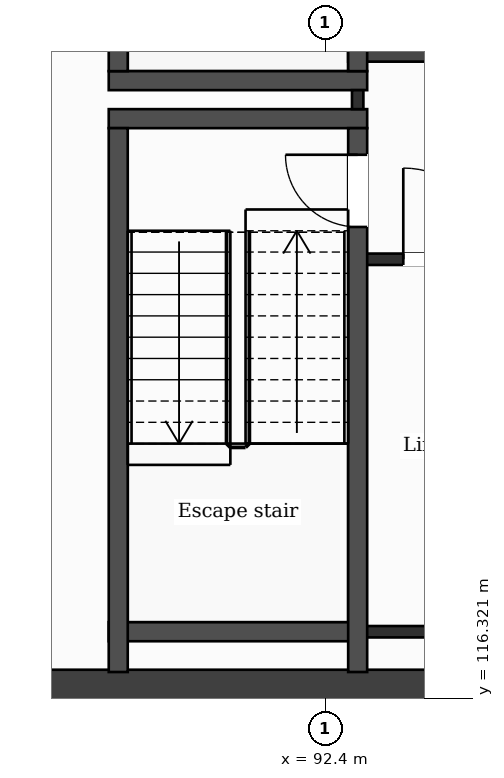
"""IFC4 building model, lengths in metres.
Left out: names, types, materials, properties, quantities, classifications, styles, units other than length and angle.
Written with IfcOpenShell. Run it as: python <this file> out.ifc"""

import sys

from ifc_helpers import new_model, si_unit, direction, frame, frame_2d, origin, place, context, subcontext, project, spatial, rectangle, extrude, element, fill, save


model = new_model("IFC4")
c1 = context("Model", 3, precision=1e-05, world=origin(), true_north=direction((0.0, 1.0)))
c2 = subcontext(c1, "Body", "Model", "MODEL_VIEW")
j1 = project(units=[si_unit("LENGTHUNIT", "METRE"), si_unit("PLANEANGLEUNIT", "RADIAN")], contexts=[c1])
p1 = place(None, origin())
s1 = spatial("IfcSite", under=j1, at=p1, CompositionType="ELEMENT")
p2 = place(p1, origin())
s2 = spatial("IfcBuilding", under=s1, at=p2, CompositionType="ELEMENT")
p3 = place(p2, frame((0.0, 0.0, 288.6)))
s3 = spatial("IfcBuildingStorey", under=s2, at=p3, CompositionType="ELEMENT", Elevation=288.6)
p4 = place(p3, frame((100.45, 116.35, 0.0), z_axis=(0.0, 0.0, 1.0), x_axis=(-1.0, 0.0, 0.0)))
e1 = element("IfcWall", 1, at=p4, inside=s3, PredefinedType="SHEAR", context=c2, shape_type="SweptSolid", body=[
    extrude(rectangle(XDim=13.627, YDim=0.7, at=frame_2d((6.813, 0.0))), origin(), (0.0, 0.0, 1.0), 3.7),
])
p5 = place(p3, frame((86.823, 116.35, 0.0), z_axis=(0.0, 0.0, 1.0), x_axis=(0.133416378607, 0.99106007382, 0.0)))
e2 = element("IfcWall", 2, at=p5, inside=s3, PredefinedType="SHEAR", context=c2, shape_type="SweptSolid", body=[
    extrude(rectangle(XDim=15.842, YDim=0.7, at=frame_2d((7.921, 0.0))), origin(), (0.0, 0.0, 1.0), 3.7),
])
p6 = place(p3, frame((92.827, 117.2, 0.0), z_axis=(0.0, 0.0, 1.0), x_axis=(1.0, 0.0, 0.0)))
e3 = element("IfcWall", 3, at=p6, inside=s3, PredefinedType="PARTITIONING", context=c2, shape_type="SweptSolid", body=[
    extrude(rectangle(XDim=2.4, YDim=0.15, at=frame_2d((1.2, 0.0))), origin(), (0.0, 0.0, 1.0), 3.38),
])
p7 = place(p3, frame((89.552, 117.2, 0.0), z_axis=(0.0, 0.0, 1.0), x_axis=(1.0, 0.0, 0.0)))
e4 = element("IfcWall", 4, at=p7, inside=s3, PredefinedType="PARTITIONING", context=c2, shape_type="SweptSolid", body=[
    extrude(rectangle(XDim=3.275, YDim=0.25, at=frame_2d((1.637, 0.0))), origin(), (0.0, 0.0, 1.0), 3.38),
])
p8 = place(p3, frame((92.827, 122.1, 0.0), z_axis=(0.0, 0.0, 1.0), x_axis=(1.0, 0.0, 0.0)))
e5 = element("IfcWall", 5, at=p8, inside=s3, PredefinedType="PARTITIONING", context=c2, shape_type="SweptSolid", body=[
    extrude(rectangle(XDim=2.4, YDim=0.15, at=frame_2d((1.2, 0.0))), origin(), (0.0, 0.0, 1.0), 3.38),
])
p9 = place(p8, frame((0.6, 0.0, 0.0)))
e6 = element("IfcOpeningElement", 6, at=p9, cuts=e5, PredefinedType="OPENING", context=c2, shape_type="SweptSolid", body=[
    extrude(rectangle(XDim=1.2, YDim=2.1, at=frame_2d((0.6, 1.05))), frame((0.0, 0.085, 0.0), z_axis=(0.0, -1.0, 0.0), x_axis=(1.0, 0.0, 0.0)), (0.0, 0.0, 1.0), 0.17),
])
for number, where, z_axis, x_axis in (
    (7, (89.552, 123.95, 0.0), (0.0, 0.0, 1.0), (1.0, 0.0, 0.0)),
    (8, (89.552, 124.45, 0.0), (0.0, 0.0, 1.0), (1.0, 0.0, 0.0)),
):
    element("IfcWall", number, at=place(p3, frame(where, z_axis=z_axis, x_axis=x_axis)), inside=s3, PredefinedType="PARTITIONING", context=c2, shape_type="SweptSolid", body=[
        extrude(rectangle(XDim=3.4, YDim=0.25, at=frame_2d((1.7, 0.0))), origin(), (0.0, 0.0, 1.0), 3.38),
    ])
p10 = place(p3, frame((92.702, 124.8, 0.0), z_axis=(0.0, 0.0, 1.0), x_axis=(1.0, 0.0, 0.0)))
e9 = element("IfcWall", 9, at=p10, inside=s3, PredefinedType="PARTITIONING", context=c2, shape_type="SweptSolid", body=[
    extrude(rectangle(XDim=7.398, YDim=0.2, at=frame_2d((3.699, 0.0))), origin(), (0.0, 0.0, 1.0), 3.38),
])
p11 = place(p10, frame((5.573, 0.0, 0.0)))
e10 = element("IfcOpeningElement", 10, at=p11, cuts=e9, PredefinedType="OPENING", context=c2, shape_type="SweptSolid", body=[
    extrude(rectangle(XDim=1.1, YDim=2.1, at=frame_2d((0.55, 1.05))), frame((0.0, 0.11, 0.0), z_axis=(0.0, -1.0, 0.0), x_axis=(1.0, 0.0, 0.0)), (0.0, 0.0, 1.0), 0.22),
])
for number, where, z_axis, x_axis in (
    (11, (89.677, 116.67, 0.0), (0.0, 0.0, 1.0), (0.0, 1.0, 0.0)),
    (12, (89.677, 124.575, 0.0), (0.0, 0.0, 1.0), (0.0, 1.0, 0.0)),
):
    element("IfcWall", number, at=place(p3, frame(where, z_axis=z_axis, x_axis=x_axis)), inside=s3, PredefinedType="PARTITIONING", context=c2, shape_type="SweptSolid", body=[
        extrude(rectangle(XDim=7.155, YDim=0.25, at=frame_2d((3.578, 0.0))), origin(), (0.0, 0.0, 1.0), 3.38),
    ])
p12 = place(p3, frame((92.827, 124.075, 0.0), z_axis=(0.0, 0.0, 1.0), x_axis=(0.0, 1.0, 0.0)))
e13 = element("IfcWall", 13, at=p12, inside=s3, PredefinedType="PARTITIONING", context=c2, shape_type="SweptSolid", body=[
    extrude(rectangle(XDim=0.25, YDim=0.15, at=frame_2d((0.125, 0.0))), origin(), (0.0, 0.0, 1.0), 3.38),
])
p13 = place(p3, frame((92.827, 116.67, 0.0), z_axis=(0.0, 0.0, 1.0), x_axis=(0.0, 1.0, 0.0)))
e14 = element("IfcWall", 14, at=p13, inside=s3, PredefinedType="PARTITIONING", context=c2, shape_type="SweptSolid", body=[
    extrude(rectangle(XDim=7.155, YDim=0.25, at=frame_2d((3.578, 0.0))), origin(), (0.0, 0.0, 1.0), 3.38),
])
p14 = place(p13, frame((5.855, 0.0, 0.0)))
e15 = element("IfcOpeningElement", 15, at=p14, cuts=e14, PredefinedType="OPENING", context=c2, shape_type="SweptSolid", body=[
    extrude(rectangle(XDim=0.95, YDim=2.1, at=frame_2d((0.475, 1.05))), frame((0.0, 0.135, 0.0), z_axis=(0.0, -1.0, 0.0), x_axis=(1.0, 0.0, 0.0)), (0.0, 0.0, 1.0), 0.27),
])
p15 = place(p3, frame((92.827, 124.575, 0.0), z_axis=(0.0, 0.0, 1.0), x_axis=(0.0, 1.0, 0.0)))
e16 = element("IfcWall", 16, at=p15, inside=s3, PredefinedType="PARTITIONING", context=c2, shape_type="SweptSolid", body=[
    extrude(rectangle(XDim=7.155, YDim=0.25, at=frame_2d((3.578, 0.0))), origin(), (0.0, 0.0, 1.0), 3.38),
])
p16 = place(p15, frame((5.325, 0.0, 0.0)))
e17 = element("IfcOpeningElement", 17, at=p16, cuts=e16, PredefinedType="OPENING", context=c2, shape_type="SweptSolid", body=[
    extrude(rectangle(XDim=1.0, YDim=2.1, at=frame_2d((0.5, 1.05))), frame((0.0, 0.135, 0.0), z_axis=(0.0, -1.0, 0.0), x_axis=(1.0, 0.0, 0.0)), (0.0, 0.0, 1.0), 0.27),
])
p17 = place(p9, origin())
e18 = element("IfcDoor", 18, at=p17, inside=s3, OperationType="SINGLE_SWING_LEFT", PredefinedType="DOOR", context=c2, shape_type="SweptSolid", body=[
    extrude(rectangle(XDim=1.2, YDim=2.1, at=frame_2d((0.6, 1.05))), frame((0.0, 0.025, 0.0), z_axis=(0.0, -1.0, 0.0), x_axis=(1.0, 0.0, 0.0)), (0.0, 0.0, 1.0), 0.05),
])
fill(e6, e18)
p18 = place(p14, origin())
e19 = element("IfcDoor", 19, at=p18, inside=s3, OperationType="SINGLE_SWING_RIGHT", PredefinedType="DOOR", context=c2, shape_type="SweptSolid", body=[
    extrude(rectangle(XDim=0.95, YDim=2.1, at=frame_2d((0.475, 1.05))), frame((0.0, 0.025, 0.0), z_axis=(0.0, -1.0, 0.0), x_axis=(1.0, 0.0, 0.0)), (0.0, 0.0, 1.0), 0.05),
])
fill(e15, e19)
save(model, sys.argv[1])
